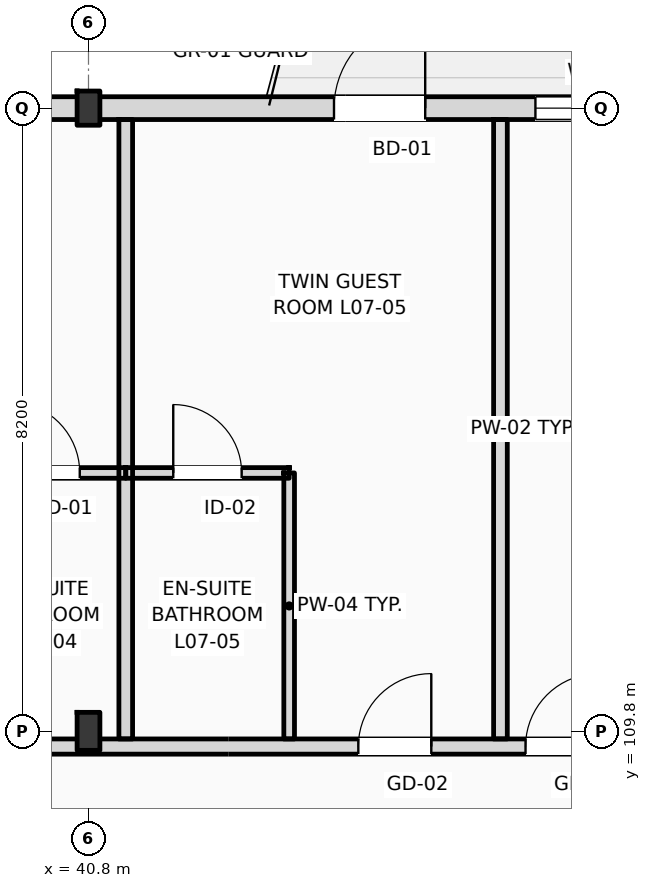
"""IFC4 building model, lengths in metres.
Left out: names, types, materials, properties, quantities, classifications, styles, units other than length and angle.
Written with IfcOpenShell. Run it as: python <this file> out.ifc"""

import sys

from ifc_helpers import new_model, si_unit, direction, frame, frame_2d, origin, origin_2d, place, context, subcontext, project, spatial, rectangle, i_section, extrude, element, fill, save


model = new_model("IFC4")
c1 = context("Model", 3, precision=1e-05, world=origin(), true_north=direction((0.0, 1.0)))
c2 = subcontext(c1, "Body", "Model", "MODEL_VIEW")
j1 = project(units=[si_unit("LENGTHUNIT", "METRE"), si_unit("PLANEANGLEUNIT", "RADIAN")], contexts=[c1])
p1 = place(None, origin())
s1 = spatial("IfcSite", under=j1, at=p1, CompositionType="ELEMENT")
p2 = place(p1, origin())
s2 = spatial("IfcBuilding", under=s1, at=p2, CompositionType="ELEMENT")
p3 = place(p2, frame((0.0, 0.0, 31.8)))
s3 = spatial("IfcBuildingStorey", under=s2, at=p3, CompositionType="ELEMENT", Elevation=31.8)
p4 = place(p3, frame((40.8, 109.8, 0.0), z_axis=(0.0, 0.0, 1.0), x_axis=(1.0, 0.0, 0.0)))
e1 = element("IfcColumn", 1, at=p4, inside=s3, PredefinedType="COLUMN", context=c2, shape_type="SweptSolid", body=[
    extrude(i_section(OverallWidth=0.3, OverallDepth=0.5, WebThickness=0.014, FlangeThickness=0.028, FilletRadius=0.027, at=origin_2d()), origin(), (0.0, 0.0, 1.0), 3.6),
])
p5 = place(p3, frame((40.8, 118.0, 0.0), z_axis=(0.0, 0.0, 1.0), x_axis=(1.0, 0.0, 0.0)))
e2 = element("IfcColumn", 2, at=p5, inside=s3, PredefinedType="COLUMN", context=c2, shape_type="SweptSolid", body=[
    extrude(i_section(OverallWidth=0.3, OverallDepth=0.45, WebThickness=0.014, FlangeThickness=0.026, FilletRadius=0.027, at=origin_2d()), origin(), (0.0, 0.0, 1.0), 3.6),
])
p6 = place(p3, frame((22.5, 118.0, 0.0), z_axis=(0.0, 0.0, 1.0), x_axis=(1.0, 0.0, 0.0)))
e3 = element("IfcWall", 3, at=p6, inside=s3, PredefinedType="STANDARD", context=c2, shape_type="SweptSolid", body=[
    extrude(rectangle(XDim=97.5, YDim=0.3, at=frame_2d((48.75, 0.0))), origin(), (0.0, 0.0, 1.0), 2.72),
])
p7 = place(p6, frame((3.61, 0.0, 0.9)))
e4 = element("IfcOpeningElement", 4, at=p7, cuts=e3, PredefinedType="OPENING", context=c2, shape_type="SweptSolid", body=[
    extrude(rectangle(XDim=1.1, YDim=1.64, at=frame_2d((0.55, 0.82))), frame((0.0, 0.16, 0.0), z_axis=(0.0, -1.0, 0.0), x_axis=(1.0, 0.0, 0.0)), (0.0, 0.0, 1.0), 0.32),
])
p8 = place(p6, frame((6.855, 0.0, 0.0)))
e5 = element("IfcOpeningElement", 5, at=p8, cuts=e3, PredefinedType="OPENING", context=c2, shape_type="SweptSolid", body=[
    extrude(rectangle(XDim=1.2, YDim=2.25, at=frame_2d((0.6, 1.125))), frame((0.0, 0.16, 0.0), z_axis=(0.0, -1.0, 0.0), x_axis=(1.0, 0.0, 0.0)), (0.0, 0.0, 1.0), 0.32),
])
p9 = place(p6, frame((11.405, 0.0, 0.9)))
e6 = element("IfcOpeningElement", 6, at=p9, cuts=e3, PredefinedType="OPENING", context=c2, shape_type="SweptSolid", body=[
    extrude(rectangle(XDim=2.1, YDim=1.64, at=frame_2d((1.05, 0.82))), frame((0.0, 0.16, 0.0), z_axis=(0.0, -1.0, 0.0), x_axis=(1.0, 0.0, 0.0)), (0.0, 0.0, 1.0), 0.32),
])
p10 = place(p6, frame((15.13, 0.0, 0.9)))
e7 = element("IfcOpeningElement", 7, at=p10, cuts=e3, PredefinedType="OPENING", context=c2, shape_type="SweptSolid", body=[
    extrude(rectangle(XDim=2.25, YDim=1.64, at=frame_2d((1.125, 0.82))), frame((0.0, 0.16, 0.0), z_axis=(0.0, -1.0, 0.0), x_axis=(1.0, 0.0, 0.0)), (0.0, 0.0, 1.0), 0.32),
])
p11 = place(p6, frame((21.53, 0.0, 0.0)))
e8 = element("IfcOpeningElement", 8, at=p11, cuts=e3, PredefinedType="OPENING", context=c2, shape_type="SweptSolid", body=[
    extrude(rectangle(XDim=1.2, YDim=2.25, at=frame_2d((0.6, 1.125))), frame((0.0, 0.16, 0.0), z_axis=(0.0, -1.0, 0.0), x_axis=(1.0, 0.0, 0.0)), (0.0, 0.0, 1.0), 0.32),
])
p12 = place(p6, frame((24.18, 0.0, 0.9)))
e9 = element("IfcOpeningElement", 9, at=p12, cuts=e3, PredefinedType="OPENING", context=c2, shape_type="SweptSolid", body=[
    extrude(rectangle(XDim=1.1, YDim=1.64, at=frame_2d((0.55, 0.82))), frame((0.0, 0.16, 0.0), z_axis=(0.0, -1.0, 0.0), x_axis=(1.0, 0.0, 0.0)), (0.0, 0.0, 1.0), 0.32),
])
p13 = place(p6, frame((29.105, 0.0, 0.9)))
e10 = element("IfcOpeningElement", 10, at=p13, cuts=e3, PredefinedType="OPENING", context=c2, shape_type="SweptSolid", body=[
    extrude(rectangle(XDim=2.7, YDim=1.64, at=frame_2d((1.35, 0.82))), frame((0.0, 0.16, 0.0), z_axis=(0.0, -1.0, 0.0), x_axis=(1.0, 0.0, 0.0)), (0.0, 0.0, 1.0), 0.32),
])
p14 = place(p6, frame((34.83, 0.0, 0.9)))
e11 = element("IfcOpeningElement", 11, at=p14, cuts=e3, PredefinedType="OPENING", context=c2, shape_type="SweptSolid", body=[
    extrude(rectangle(XDim=1.8, YDim=1.64, at=frame_2d((0.9, 0.82))), frame((0.0, 0.16, 0.0), z_axis=(0.0, -1.0, 0.0), x_axis=(1.0, 0.0, 0.0)), (0.0, 0.0, 1.0), 0.32),
])
p15 = place(p6, frame((38.525, 0.0, 0.0)))
e12 = element("IfcOpeningElement", 12, at=p15, cuts=e3, PredefinedType="OPENING", context=c2, shape_type="SweptSolid", body=[
    extrude(rectangle(XDim=1.2, YDim=2.25, at=frame_2d((0.6, 1.125))), frame((0.0, 0.16, 0.0), z_axis=(0.0, -1.0, 0.0), x_axis=(1.0, 0.0, 0.0)), (0.0, 0.0, 1.0), 0.32),
])
p16 = place(p6, frame((42.73, 0.0, 0.9)))
e13 = element("IfcOpeningElement", 13, at=p16, cuts=e3, PredefinedType="OPENING", context=c2, shape_type="SweptSolid", body=[
    extrude(rectangle(XDim=3.05, YDim=1.64, at=frame_2d((1.525, 0.82))), frame((0.0, 0.16, 0.0), z_axis=(0.0, -1.0, 0.0), x_axis=(1.0, 0.0, 0.0)), (0.0, 0.0, 1.0), 0.32),
])
p17 = place(p6, frame((47.155, 0.0, 0.9)))
e14 = element("IfcOpeningElement", 14, at=p17, cuts=e3, PredefinedType="OPENING", context=c2, shape_type="SweptSolid", body=[
    extrude(rectangle(XDim=1.35, YDim=1.64, at=frame_2d((0.675, 0.82))), frame((0.0, 0.16, 0.0), z_axis=(0.0, -1.0, 0.0), x_axis=(1.0, 0.0, 0.0)), (0.0, 0.0, 1.0), 0.32),
])
p18 = place(p6, frame((53.065, 0.0, 0.0)))
e15 = element("IfcOpeningElement", 15, at=p18, cuts=e3, PredefinedType="OPENING", context=c2, shape_type="SweptSolid", body=[
    extrude(rectangle(XDim=1.2, YDim=2.25, at=frame_2d((0.6, 1.125))), frame((0.0, 0.16, 0.0), z_axis=(0.0, -1.0, 0.0), x_axis=(1.0, 0.0, 0.0)), (0.0, 0.0, 1.0), 0.32),
])
p19 = place(p6, frame((58.2, 0.0, 0.9)))
e16 = element("IfcOpeningElement", 16, at=p19, cuts=e3, PredefinedType="OPENING", context=c2, shape_type="SweptSolid", body=[
    extrude(rectangle(XDim=1.8, YDim=1.64, at=frame_2d((0.9, 0.82))), frame((0.0, 0.16, 0.0), z_axis=(0.0, -1.0, 0.0), x_axis=(1.0, 0.0, 0.0)), (0.0, 0.0, 1.0), 0.32),
])
p20 = place(p6, frame((61.13, 0.0, 0.9)))
e17 = element("IfcOpeningElement", 17, at=p20, cuts=e3, PredefinedType="OPENING", context=c2, shape_type="SweptSolid", body=[
    extrude(rectangle(XDim=3.05, YDim=1.64, at=frame_2d((1.525, 0.82))), frame((0.0, 0.16, 0.0), z_axis=(0.0, -1.0, 0.0), x_axis=(1.0, 0.0, 0.0)), (0.0, 0.0, 1.0), 0.32),
])
p21 = place(p6, frame((67.93, 0.0, 0.0)))
e18 = element("IfcOpeningElement", 18, at=p21, cuts=e3, PredefinedType="OPENING", context=c2, shape_type="SweptSolid", body=[
    extrude(rectangle(XDim=1.2, YDim=2.25, at=frame_2d((0.6, 1.125))), frame((0.0, 0.16, 0.0), z_axis=(0.0, -1.0, 0.0), x_axis=(1.0, 0.0, 0.0)), (0.0, 0.0, 1.0), 0.32),
])
p22 = place(p6, frame((70.39, 0.0, 0.0)))
e19 = element("IfcOpeningElement", 19, at=p22, cuts=e3, PredefinedType="OPENING", context=c2, shape_type="SweptSolid", body=[
    extrude(rectangle(XDim=1.2, YDim=2.25, at=frame_2d((0.6, 1.125))), frame((0.0, 0.16, 0.0), z_axis=(0.0, -1.0, 0.0), x_axis=(1.0, 0.0, 0.0)), (0.0, 0.0, 1.0), 0.32),
])
p23 = place(p6, frame((75.905, 0.0, 0.9)))
e20 = element("IfcOpeningElement", 20, at=p23, cuts=e3, PredefinedType="OPENING", context=c2, shape_type="SweptSolid", body=[
    extrude(rectangle(XDim=1.1, YDim=1.5, at=frame_2d((0.55, 0.75))), frame((0.0, 0.16, 0.0), z_axis=(0.0, -1.0, 0.0), x_axis=(1.0, 0.0, 0.0)), (0.0, 0.0, 1.0), 0.32),
])
p24 = place(p6, frame((81.63, 0.0, 0.9)))
e21 = element("IfcOpeningElement", 21, at=p24, cuts=e3, PredefinedType="OPENING", context=c2, shape_type="SweptSolid", body=[
    extrude(rectangle(XDim=1.1, YDim=1.6, at=frame_2d((0.55, 0.8))), frame((0.0, 0.16, 0.0), z_axis=(0.0, -1.0, 0.0), x_axis=(1.0, 0.0, 0.0)), (0.0, 0.0, 1.0), 0.32),
])
p25 = place(p6, frame((84.955, 0.0, 0.9)))
e22 = element("IfcOpeningElement", 22, at=p25, cuts=e3, PredefinedType="OPENING", context=c2, shape_type="SweptSolid", body=[
    extrude(rectangle(XDim=1.4, YDim=1.64, at=frame_2d((0.7, 0.82))), frame((0.0, 0.16, 0.0), z_axis=(0.0, -1.0, 0.0), x_axis=(1.0, 0.0, 0.0)), (0.0, 0.0, 1.0), 0.32),
])
p26 = place(p6, frame((90.055, 0.0, 0.9)))
e23 = element("IfcOpeningElement", 23, at=p26, cuts=e3, PredefinedType="OPENING", context=c2, shape_type="SweptSolid", body=[
    extrude(rectangle(XDim=1.6, YDim=1.64, at=frame_2d((0.8, 0.82))), frame((0.0, 0.16, 0.0), z_axis=(0.0, -1.0, 0.0), x_axis=(1.0, 0.0, 0.0)), (0.0, 0.0, 1.0), 0.32),
])
p27 = place(p6, frame((93.87, 0.0, 0.9)))
e24 = element("IfcOpeningElement", 24, at=p27, cuts=e3, PredefinedType="OPENING", context=c2, shape_type="SweptSolid", body=[
    extrude(rectangle(XDim=1.75, YDim=1.64, at=frame_2d((0.875, 0.82))), frame((0.0, 0.16, 0.0), z_axis=(0.0, -1.0, 0.0), x_axis=(1.0, 0.0, 0.0)), (0.0, 0.0, 1.0), 0.32),
])
p28 = place(p3, frame((10.65, 109.6, 0.0), z_axis=(0.0, 0.0, 1.0), x_axis=(1.0, 0.0, 0.0)))
e25 = element("IfcWall", 25, at=p28, inside=s3, PredefinedType="PARTITIONING", context=c2, shape_type="SweptSolid", body=[
    extrude(rectangle(XDim=109.21, YDim=0.2, at=frame_2d((54.605, 0.0))), origin(), (0.0, 0.0, 1.0), 2.72),
])
p29 = place(p28, frame((15.825, 0.0, 0.0)))
e26 = element("IfcOpeningElement", 26, at=p29, cuts=e25, PredefinedType="OPENING", context=c2, shape_type="SweptSolid", body=[
    extrude(rectangle(XDim=1.02, YDim=2.2, at=frame_2d((0.51, 1.1))), frame((0.0, 0.11, 0.0), z_axis=(0.0, -1.0, 0.0), x_axis=(1.0, 0.0, 0.0)), (0.0, 0.0, 1.0), 0.22),
])
p30 = place(p28, frame((19.87, 0.0, 0.0)))
e27 = element("IfcOpeningElement", 27, at=p30, cuts=e25, PredefinedType="OPENING", context=c2, shape_type="SweptSolid", body=[
    extrude(rectangle(XDim=1.02, YDim=2.2, at=frame_2d((0.51, 1.1))), frame((0.0, 0.11, 0.0), z_axis=(0.0, -1.0, 0.0), x_axis=(1.0, 0.0, 0.0)), (0.0, 0.0, 1.0), 0.22),
])
p31 = place(p28, frame((24.47, 0.0, 0.0)))
e28 = element("IfcOpeningElement", 28, at=p31, cuts=e25, PredefinedType="OPENING", context=c2, shape_type="SweptSolid", body=[
    extrude(rectangle(XDim=1.02, YDim=2.2, at=frame_2d((0.51, 1.1))), frame((0.0, 0.11, 0.0), z_axis=(0.0, -1.0, 0.0), x_axis=(1.0, 0.0, 0.0)), (0.0, 0.0, 1.0), 0.22),
])
p32 = place(p28, frame((26.92, 0.0, 0.0)))
e29 = element("IfcOpeningElement", 29, at=p32, cuts=e25, PredefinedType="OPENING", context=c2, shape_type="SweptSolid", body=[
    extrude(rectangle(XDim=1.02, YDim=2.2, at=frame_2d((0.51, 1.1))), frame((0.0, 0.11, 0.0), z_axis=(0.0, -1.0, 0.0), x_axis=(1.0, 0.0, 0.0)), (0.0, 0.0, 1.0), 0.22),
])
p33 = place(p28, frame((33.7, 0.0, 0.0)))
e30 = element("IfcOpeningElement", 30, at=p33, cuts=e25, PredefinedType="OPENING", context=c2, shape_type="SweptSolid", body=[
    extrude(rectangle(XDim=0.96, YDim=2.2, at=frame_2d((0.48, 1.1))), frame((0.0, 0.11, 0.0), z_axis=(0.0, -1.0, 0.0), x_axis=(1.0, 0.0, 0.0)), (0.0, 0.0, 1.0), 0.22),
])
p34 = place(p28, frame((35.9, 0.0, 0.0)))
e31 = element("IfcOpeningElement", 31, at=p34, cuts=e25, PredefinedType="OPENING", context=c2, shape_type="SweptSolid", body=[
    extrude(rectangle(XDim=0.96, YDim=2.2, at=frame_2d((0.48, 1.1))), frame((0.0, 0.11, 0.0), z_axis=(0.0, -1.0, 0.0), x_axis=(1.0, 0.0, 0.0)), (0.0, 0.0, 1.0), 0.22),
])
p35 = place(p28, frame((42.9, 0.0, 0.0)))
e32 = element("IfcOpeningElement", 32, at=p35, cuts=e25, PredefinedType="OPENING", context=c2, shape_type="SweptSolid", body=[
    extrude(rectangle(XDim=0.96, YDim=2.2, at=frame_2d((0.48, 1.1))), frame((0.0, 0.11, 0.0), z_axis=(0.0, -1.0, 0.0), x_axis=(1.0, 0.0, 0.0)), (0.0, 0.0, 1.0), 0.22),
])
p36 = place(p28, frame((47.5, 0.0, 0.0)))
e33 = element("IfcOpeningElement", 33, at=p36, cuts=e25, PredefinedType="OPENING", context=c2, shape_type="SweptSolid", body=[
    extrude(rectangle(XDim=0.96, YDim=2.2, at=frame_2d((0.48, 1.1))), frame((0.0, 0.11, 0.0), z_axis=(0.0, -1.0, 0.0), x_axis=(1.0, 0.0, 0.0)), (0.0, 0.0, 1.0), 0.22),
])
p37 = place(p28, frame((49.95, 0.0, 0.0)))
e34 = element("IfcOpeningElement", 34, at=p37, cuts=e25, PredefinedType="OPENING", context=c2, shape_type="SweptSolid", body=[
    extrude(rectangle(XDim=0.96, YDim=2.2, at=frame_2d((0.48, 1.1))), frame((0.0, 0.11, 0.0), z_axis=(0.0, -1.0, 0.0), x_axis=(1.0, 0.0, 0.0)), (0.0, 0.0, 1.0), 0.22),
])
p38 = place(p28, frame((56.7, 0.0, 0.0)))
e35 = element("IfcOpeningElement", 35, at=p38, cuts=e25, PredefinedType="OPENING", context=c2, shape_type="SweptSolid", body=[
    extrude(rectangle(XDim=0.96, YDim=2.2, at=frame_2d((0.48, 1.1))), frame((0.0, 0.11, 0.0), z_axis=(0.0, -1.0, 0.0), x_axis=(1.0, 0.0, 0.0)), (0.0, 0.0, 1.0), 0.22),
])
p39 = place(p28, frame((59.15, 0.0, 0.0)))
e36 = element("IfcOpeningElement", 36, at=p39, cuts=e25, PredefinedType="OPENING", context=c2, shape_type="SweptSolid", body=[
    extrude(rectangle(XDim=0.96, YDim=2.2, at=frame_2d((0.48, 1.1))), frame((0.0, 0.11, 0.0), z_axis=(0.0, -1.0, 0.0), x_axis=(1.0, 0.0, 0.0)), (0.0, 0.0, 1.0), 0.22),
])
p40 = place(p28, frame((65.9, 0.0, 0.0)))
e37 = element("IfcOpeningElement", 37, at=p40, cuts=e25, PredefinedType="OPENING", context=c2, shape_type="SweptSolid", body=[
    extrude(rectangle(XDim=0.96, YDim=2.2, at=frame_2d((0.48, 1.1))), frame((0.0, 0.11, 0.0), z_axis=(0.0, -1.0, 0.0), x_axis=(1.0, 0.0, 0.0)), (0.0, 0.0, 1.0), 0.22),
])
p41 = place(p28, frame((70.5, 0.0, 0.0)))
e38 = element("IfcOpeningElement", 38, at=p41, cuts=e25, PredefinedType="OPENING", context=c2, shape_type="SweptSolid", body=[
    extrude(rectangle(XDim=0.96, YDim=2.2, at=frame_2d((0.48, 1.1))), frame((0.0, 0.11, 0.0), z_axis=(0.0, -1.0, 0.0), x_axis=(1.0, 0.0, 0.0)), (0.0, 0.0, 1.0), 0.22),
])
p42 = place(p28, frame((72.95, 0.0, 0.0)))
e39 = element("IfcOpeningElement", 39, at=p42, cuts=e25, PredefinedType="OPENING", context=c2, shape_type="SweptSolid", body=[
    extrude(rectangle(XDim=0.96, YDim=2.2, at=frame_2d((0.48, 1.1))), frame((0.0, 0.11, 0.0), z_axis=(0.0, -1.0, 0.0), x_axis=(1.0, 0.0, 0.0)), (0.0, 0.0, 1.0), 0.22),
])
p43 = place(p28, frame((79.7, 0.0, 0.0)))
e40 = element("IfcOpeningElement", 40, at=p43, cuts=e25, PredefinedType="OPENING", context=c2, shape_type="SweptSolid", body=[
    extrude(rectangle(XDim=0.96, YDim=2.2, at=frame_2d((0.48, 1.1))), frame((0.0, 0.11, 0.0), z_axis=(0.0, -1.0, 0.0), x_axis=(1.0, 0.0, 0.0)), (0.0, 0.0, 1.0), 0.22),
])
p44 = place(p28, frame((82.15, 0.0, 0.0)))
e41 = element("IfcOpeningElement", 41, at=p44, cuts=e25, PredefinedType="OPENING", context=c2, shape_type="SweptSolid", body=[
    extrude(rectangle(XDim=0.96, YDim=2.2, at=frame_2d((0.48, 1.1))), frame((0.0, 0.11, 0.0), z_axis=(0.0, -1.0, 0.0), x_axis=(1.0, 0.0, 0.0)), (0.0, 0.0, 1.0), 0.22),
])
p45 = place(p28, frame((88.9, 0.0, 0.0)))
e42 = element("IfcOpeningElement", 42, at=p45, cuts=e25, PredefinedType="OPENING", context=c2, shape_type="SweptSolid", body=[
    extrude(rectangle(XDim=0.96, YDim=2.2, at=frame_2d((0.48, 1.1))), frame((0.0, 0.11, 0.0), z_axis=(0.0, -1.0, 0.0), x_axis=(1.0, 0.0, 0.0)), (0.0, 0.0, 1.0), 0.22),
])
p46 = place(p28, frame((93.75, 0.0, 0.0)))
e43 = element("IfcOpeningElement", 43, at=p46, cuts=e25, PredefinedType="OPENING", context=c2, shape_type="SweptSolid", body=[
    extrude(rectangle(XDim=0.96, YDim=2.2, at=frame_2d((0.48, 1.1))), frame((0.0, 0.11, 0.0), z_axis=(0.0, -1.0, 0.0), x_axis=(1.0, 0.0, 0.0)), (0.0, 0.0, 1.0), 0.22),
])
p47 = place(p28, frame((98.1, 0.0, 0.0)))
e44 = element("IfcOpeningElement", 44, at=p47, cuts=e25, PredefinedType="OPENING", context=c2, shape_type="SweptSolid", body=[
    extrude(rectangle(XDim=0.96, YDim=2.2, at=frame_2d((0.48, 1.1))), frame((0.0, 0.11, 0.0), z_axis=(0.0, -1.0, 0.0), x_axis=(1.0, 0.0, 0.0)), (0.0, 0.0, 1.0), 0.22),
])
p48 = place(p28, frame((102.7, 0.0, 0.0)))
e45 = element("IfcOpeningElement", 45, at=p48, cuts=e25, PredefinedType="OPENING", context=c2, shape_type="SweptSolid", body=[
    extrude(rectangle(XDim=0.96, YDim=2.2, at=frame_2d((0.48, 1.1))), frame((0.0, 0.11, 0.0), z_axis=(0.0, -1.0, 0.0), x_axis=(1.0, 0.0, 0.0)), (0.0, 0.0, 1.0), 0.22),
])
p49 = place(p28, frame((105.04, 0.0, 0.0)))
e46 = element("IfcOpeningElement", 46, at=p49, cuts=e25, PredefinedType="OPENING", context=c2, shape_type="SweptSolid", body=[
    extrude(rectangle(XDim=0.96, YDim=2.2, at=frame_2d((0.48, 1.1))), frame((0.0, 0.11, 0.0), z_axis=(0.0, -1.0, 0.0), x_axis=(1.0, 0.0, 0.0)), (0.0, 0.0, 1.0), 0.22),
])
p50 = place(p28, frame((2.716, 0.0, 0.0)))
e47 = element("IfcOpeningElement", 47, at=p50, cuts=e25, PredefinedType="OPENING", context=c2, shape_type="SweptSolid", body=[
    extrude(rectangle(XDim=1.35, YDim=2.25, at=frame_2d((0.675, 1.125))), frame((0.0, 0.11, 0.0), z_axis=(0.0, -1.0, 0.0), x_axis=(1.0, 0.0, 0.0)), (0.0, 0.0, 1.0), 0.22),
])
p51 = place(p28, frame((6.65, 0.0, 0.0)))
e48 = element("IfcOpeningElement", 48, at=p51, cuts=e25, PredefinedType="OPENING", context=c2, shape_type="SweptSolid", body=[
    extrude(rectangle(XDim=1.35, YDim=2.25, at=frame_2d((0.675, 1.125))), frame((0.0, 0.11, 0.0), z_axis=(0.0, -1.0, 0.0), x_axis=(1.0, 0.0, 0.0)), (0.0, 0.0, 1.0), 0.22),
])
p52 = place(p28, frame((10.583, 0.0, 0.0)))
e49 = element("IfcOpeningElement", 49, at=p52, cuts=e25, PredefinedType="OPENING", context=c2, shape_type="SweptSolid", body=[
    extrude(rectangle(XDim=1.35, YDim=2.25, at=frame_2d((0.675, 1.125))), frame((0.0, 0.11, 0.0), z_axis=(0.0, -1.0, 0.0), x_axis=(1.0, 0.0, 0.0)), (0.0, 0.0, 1.0), 0.22),
])
p53 = place(p3, frame((41.29, 109.7, 0.0), z_axis=(0.0, 0.0, 1.0), x_axis=(0.0, 1.0, 0.0)))
e50 = element("IfcWall", 50, at=p53, inside=s3, PredefinedType="PARTITIONING", context=c2, shape_type="SweptSolid", body=[
    extrude(rectangle(XDim=8.15, YDim=0.18, at=frame_2d((4.075, 0.0))), origin(), (0.0, 0.0, 1.0), 3.36),
])
p54 = place(p3, frame((39.14, 113.2, 0.0), z_axis=(0.0, 0.0, 1.0), x_axis=(1.0, 0.0, 0.0)))
e51 = element("IfcWall", 51, at=p54, inside=s3, PredefinedType="PARTITIONING", context=c2, shape_type="SweptSolid", body=[
    extrude(rectangle(XDim=2.15, YDim=0.14, at=frame_2d((1.075, 0.0))), origin(), (0.0, 0.0, 1.0), 3.36),
])
p55 = place(p54, frame((0.605, 0.0, 0.0)))
e52 = element("IfcOpeningElement", 52, at=p55, cuts=e51, PredefinedType="OPENING", context=c2, shape_type="SweptSolid", body=[
    extrude(rectangle(XDim=0.94, YDim=2.15, at=frame_2d((0.47, 1.075))), frame((0.0, 0.08, 0.0), z_axis=(0.0, -1.0, 0.0), x_axis=(1.0, 0.0, 0.0)), (0.0, 0.0, 1.0), 0.16),
])
p56 = place(p3, frame((46.22, 109.7, 0.0), z_axis=(0.0, 0.0, 1.0), x_axis=(0.0, 1.0, 0.0)))
e53 = element("IfcWall", 53, at=p56, inside=s3, PredefinedType="PARTITIONING", context=c2, shape_type="SweptSolid", body=[
    extrude(rectangle(XDim=8.15, YDim=0.18, at=frame_2d((4.075, 0.0))), origin(), (0.0, 0.0, 1.0), 3.05),
])
p57 = place(p3, frame((43.44, 109.7, 0.0), z_axis=(0.0, 0.0, 1.0), x_axis=(0.0, 1.0, 0.0)))
e54 = element("IfcWall", 54, at=p57, inside=s3, PredefinedType="PARTITIONING", context=c2, shape_type="SweptSolid", body=[
    extrude(rectangle(XDim=3.5, YDim=0.14, at=frame_2d((1.75, 0.0))), origin(), (0.0, 0.0, 1.0), 3.05),
])
p58 = place(p3, frame((41.29, 113.2, 0.0), z_axis=(0.0, 0.0, 1.0), x_axis=(1.0, 0.0, 0.0)))
e55 = element("IfcWall", 55, at=p58, inside=s3, PredefinedType="PARTITIONING", context=c2, shape_type="SweptSolid", body=[
    extrude(rectangle(XDim=2.15, YDim=0.14, at=frame_2d((1.075, 0.0))), origin(), (0.0, 0.0, 1.0), 3.36),
])
p59 = place(p58, frame((0.625, 0.0, 0.0)))
e56 = element("IfcOpeningElement", 56, at=p59, cuts=e55, PredefinedType="OPENING", context=c2, shape_type="SweptSolid", body=[
    extrude(rectangle(XDim=0.9, YDim=2.1, at=frame_2d((0.45, 1.05))), frame((0.0, 0.08, 0.0), z_axis=(0.0, -1.0, 0.0), x_axis=(1.0, 0.0, 0.0)), (0.0, 0.0, 1.0), 0.16),
])
p60 = place(p11, origin())
e57 = element("IfcDoor", 57, at=p60, inside=s3, OperationType="SINGLE_SWING_RIGHT", PredefinedType="DOOR", context=c2, shape_type="SweptSolid", body=[
    extrude(rectangle(XDim=1.2, YDim=2.25, at=frame_2d((0.6, 1.125))), frame((0.0, 0.025, 0.0), z_axis=(0.0, -1.0, 0.0), x_axis=(1.0, 0.0, 0.0)), (0.0, 0.0, 1.0), 0.05),
])
fill(e8, e57)
p61 = place(p12, origin())
e58 = element("IfcWindow", 58, at=p61, inside=s3, PartitioningType="DOUBLE_PANEL_VERTICAL", PredefinedType="WINDOW", context=c2, shape_type="SweptSolid", body=[
    extrude(rectangle(XDim=1.1, YDim=1.64, at=frame_2d((0.55, 0.82))), frame((0.0, 0.03, 0.0), z_axis=(0.0, -1.0, 0.0), x_axis=(1.0, 0.0, 0.0)), (0.0, 0.0, 1.0), 0.06),
])
fill(e9, e58)
p62 = place(p55, origin())
e59 = element("IfcDoor", 59, at=p62, inside=s3, OperationType="SINGLE_SWING_LEFT", PredefinedType="DOOR", context=c2, shape_type="SweptSolid", body=[
    extrude(rectangle(XDim=0.94, YDim=2.15, at=frame_2d((0.47, 1.075))), frame((0.0, 0.025, 0.0), z_axis=(0.0, -1.0, 0.0), x_axis=(1.0, 0.0, 0.0)), (0.0, 0.0, 1.0), 0.05),
])
fill(e52, e59)
p63 = place(p33, origin())
e60 = element("IfcDoor", 60, at=p63, inside=s3, OperationType="SINGLE_SWING_RIGHT", PredefinedType="DOOR", context=c2, shape_type="SweptSolid", body=[
    extrude(rectangle(XDim=0.96, YDim=2.2, at=frame_2d((0.48, 1.1))), frame((0.0, 0.025, 0.0), z_axis=(0.0, -1.0, 0.0), x_axis=(1.0, 0.0, 0.0)), (0.0, 0.0, 1.0), 0.05),
])
fill(e30, e60)
p64 = place(p59, origin())
e61 = element("IfcDoor", 61, at=p64, inside=s3, OperationType="SINGLE_SWING_LEFT", PredefinedType="DOOR", context=c2, shape_type="SweptSolid", body=[
    extrude(rectangle(XDim=0.9, YDim=2.1, at=frame_2d((0.45, 1.05))), frame((0.0, 0.025, 0.0), z_axis=(0.0, -1.0, 0.0), x_axis=(1.0, 0.0, 0.0)), (0.0, 0.0, 1.0), 0.05),
])
fill(e56, e61)
p65 = place(p34, origin())
e62 = element("IfcDoor", 62, at=p65, inside=s3, OperationType="SINGLE_SWING_RIGHT", PredefinedType="DOOR", context=c2, shape_type="SweptSolid", body=[
    extrude(rectangle(XDim=0.96, YDim=2.2, at=frame_2d((0.48, 1.1))), frame((0.0, 0.025, 0.0), z_axis=(0.0, -1.0, 0.0), x_axis=(1.0, 0.0, 0.0)), (0.0, 0.0, 1.0), 0.05),
])
fill(e31, e62)
save(model, sys.argv[1])
